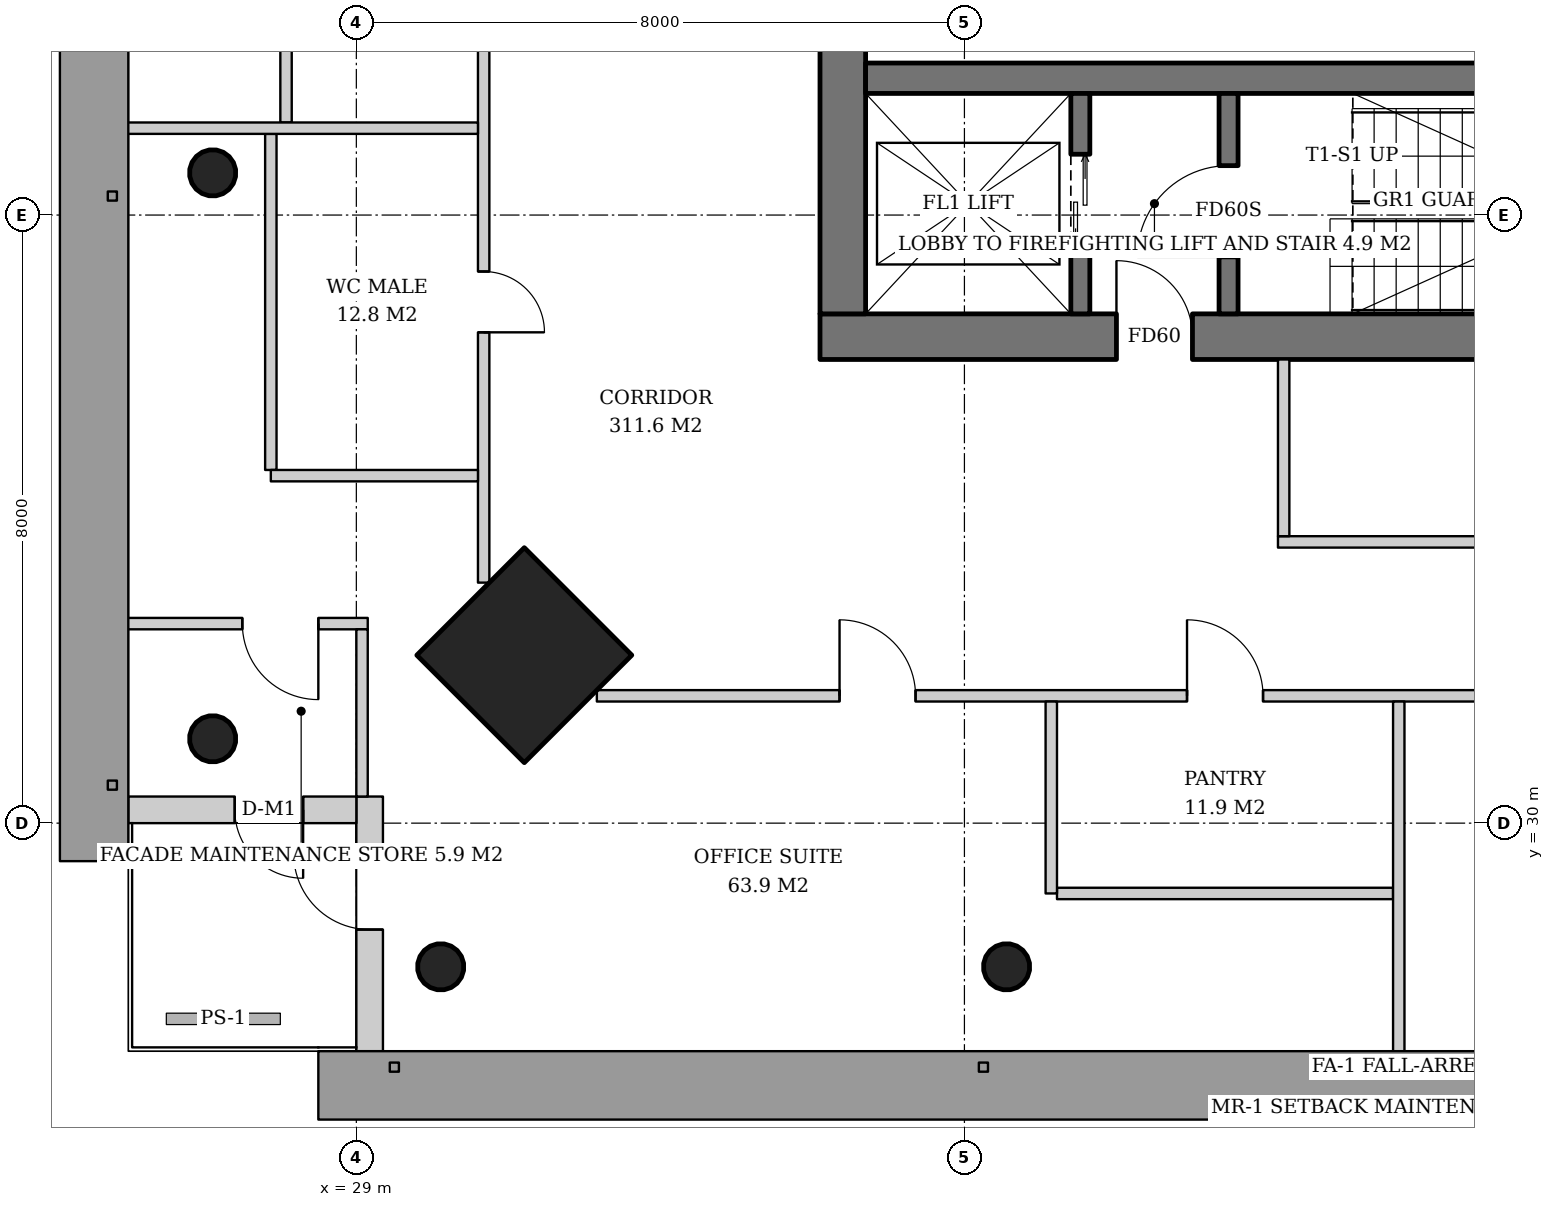
"""IFC4 building model, lengths in metres.
Left out: names, types, materials, properties, quantities, classifications, styles, units other than length and angle.
Written with IfcOpenShell. Run it as: python <this file> out.ifc"""

import sys

from ifc_helpers import new_model, si_unit, direction, frame, frame_2d, origin, origin_2d, place, context, subcontext, project, spatial, rectangle, hollow_circle, extrude, element, fill, save


model = new_model("IFC4")
c1 = context("Model", 3, precision=1e-05, world=origin(), true_north=direction((0.0, 1.0)))
c2 = subcontext(c1, "Body", "Model", "MODEL_VIEW")
j1 = project(units=[si_unit("LENGTHUNIT", "METRE"), si_unit("PLANEANGLEUNIT", "RADIAN")], contexts=[c1])
p1 = place(None, origin())
s1 = spatial("IfcSite", under=j1, at=p1, CompositionType="ELEMENT")
p2 = place(p1, origin())
s2 = spatial("IfcBuilding", under=s1, at=p2, CompositionType="ELEMENT")
p3 = place(p2, frame((0.0, 0.0, 211.0)))
s3 = spatial("IfcBuildingStorey", under=s2, at=p3, CompositionType="ELEMENT", Elevation=211.0)
p4 = place(p3, frame((31.171, 32.171, 0.0), z_axis=(0.031962158256, 0.031962158256, 0.998977898093), x_axis=(-0.707106781187, 0.707106781187, 0.0)))
e1 = element("IfcColumn", 1, at=p4, inside=s3, PredefinedType="COLUMN", context=c2, shape_type="SweptSolid", body=[
    extrude(rectangle(XDim=2.0, YDim=2.0, at=origin_2d()), origin(), (0.0, 0.0, 1.0), 3.804),
])
p5 = place(p3, frame((27.072, 31.072, 0.0), z_axis=(0.031898107953, 0.031898107953, 0.998981992539), x_axis=(-0.707106781187, 0.707106781187, 0.0)))
e2 = element("IfcColumn", 2, at=p5, inside=s3, PredefinedType="COLUMN", context=c2, shape_type="SweptSolid", body=[
    extrude(hollow_circle(Radius=0.305, WallThickness=0.025, at=origin_2d()), origin(), (0.0, 0.0, 1.0), 3.804),
])
p6 = place(p3, frame((27.072, 38.536, 0.0), z_axis=(0.031910269556, 0.015987237665, 0.999362868496), x_axis=(-0.447933021895, 0.894067115991, 0.0)))
e3 = element("IfcColumn", 3, at=p6, inside=s3, PredefinedType="COLUMN", context=c2, shape_type="SweptSolid", body=[
    extrude(hollow_circle(Radius=0.305, WallThickness=0.025, at=origin_2d()), origin(), (0.0, 0.0, 1.0), 3.802),
])
p7 = place(p3, frame((30.072, 28.072, 0.0), z_axis=(0.031898107953, 0.031898107953, 0.998981992539), x_axis=(-0.707106781187, 0.707106781187, 0.0)))
e4 = element("IfcColumn", 4, at=p7, inside=s3, PredefinedType="COLUMN", context=c2, shape_type="SweptSolid", body=[
    extrude(hollow_circle(Radius=0.305, WallThickness=0.025, at=origin_2d()), origin(), (0.0, 0.0, 1.0), 3.804),
])
p8 = place(p3, frame((37.536, 28.072, 0.0), z_axis=(0.015987237665, 0.031910269556, 0.999362868496), x_axis=(-0.894067115991, 0.447933021895, 0.0)))
e5 = element("IfcColumn", 5, at=p8, inside=s3, PredefinedType="COLUMN", context=c2, shape_type="SweptSolid", body=[
    extrude(hollow_circle(Radius=0.305, WallThickness=0.025, at=origin_2d()), origin(), (0.0, 0.0, 1.0), 3.802),
])
p9 = place(p3, frame((35.1, 36.4, 0.0), z_axis=(0.0, 0.0, 1.0), x_axis=(1.0, 0.0, 0.0)))
e6 = element("IfcWall", 6, at=p9, inside=s3, PredefinedType="SHEAR", context=c2, shape_type="SweptSolid", body=[
    extrude(rectangle(XDim=19.8, YDim=0.6, at=frame_2d((9.9, 0.0))), origin(), (0.0, 0.0, 1.0), 3.8),
])
p10 = place(p9, frame((3.9, 0.0, 0.0)))
e7 = element("IfcOpeningElement", 7, at=p10, cuts=e6, PredefinedType="OPENING", context=c2, shape_type="SweptSolid", body=[
    extrude(rectangle(XDim=1.0, YDim=2.1, at=frame_2d((0.5, 1.05))), frame((0.0, 0.31, 0.0), z_axis=(0.0, -1.0, 0.0), x_axis=(1.0, 0.0, 0.0)), (0.0, 0.0, 1.0), 0.62),
])
p11 = place(p9, frame((15.35, 0.0, 0.0)))
e8 = element("IfcOpeningElement", 8, at=p11, cuts=e6, PredefinedType="OPENING", context=c2, shape_type="SweptSolid", body=[
    extrude(rectangle(XDim=1.0, YDim=2.1, at=frame_2d((0.5, 1.05))), frame((0.0, 0.31, 0.0), z_axis=(0.0, -1.0, 0.0), x_axis=(1.0, 0.0, 0.0)), (0.0, 0.0, 1.0), 0.62),
])
p12 = place(p3, frame((35.4, 36.7, 0.0), z_axis=(0.0, 0.0, 1.0), x_axis=(0.0, 1.0, 0.0)))
e9 = element("IfcWall", 9, at=p12, inside=s3, PredefinedType="SHEAR", context=c2, shape_type="SweptSolid", body=[
    extrude(rectangle(XDim=18.6, YDim=0.6, at=frame_2d((9.3, 0.0))), origin(), (0.0, 0.0, 1.0), 3.8),
])
p13 = place(p12, frame((8.4, 0.0, 0.0)))
e10 = element("IfcOpeningElement", 10, at=p13, cuts=e9, PredefinedType="OPENING", context=c2, shape_type="SweptSolid", body=[
    extrude(rectangle(XDim=1.8, YDim=2.4, at=frame_2d((0.9, 1.2))), frame((0.0, 0.31, 0.0), z_axis=(0.0, -1.0, 0.0), x_axis=(1.0, 0.0, 0.0)), (0.0, 0.0, 1.0), 0.62),
])
p14 = place(p3, frame((35.7, 39.8, 0.0), z_axis=(0.0, 0.0, 1.0), x_axis=(1.0, 0.0, 0.0)))
e11 = element("IfcWall", 11, at=p14, inside=s3, PredefinedType="SHEAR", context=c2, shape_type="SweptSolid", body=[
    extrude(rectangle(XDim=18.6, YDim=0.4, at=frame_2d((9.3, 0.0))), origin(), (0.0, 0.0, 1.0), 3.8),
])
p15 = place(p3, frame((29.175, 27.0, 0.0), z_axis=(0.0, 0.0, 1.0), x_axis=(0.0, 1.0, 0.0)))
e12 = element("IfcWall", 12, at=p15, inside=s3, PredefinedType="SOLIDWALL", context=c2, shape_type="SweptSolid", body=[
    extrude(rectangle(XDim=3.35, YDim=0.35, at=frame_2d((1.675, 0.0))), origin(), (0.0, 0.0, 1.0), 3.62),
])
p16 = place(p15, frame((1.6, 0.0, 0.0)))
e13 = element("IfcOpeningElement", 13, at=p16, cuts=e12, PredefinedType="OPENING", context=c2, shape_type="SweptSolid", body=[
    extrude(rectangle(XDim=1.0, YDim=2.4, at=frame_2d((0.5, 1.2))), frame((0.0, 0.185, 0.0), z_axis=(0.0, -1.0, 0.0), x_axis=(1.0, 0.0, 0.0)), (0.0, 0.0, 1.0), 0.37),
])
p17 = place(p3, frame((29.0, 30.175, 0.0), z_axis=(0.0, 0.0, 1.0), x_axis=(-1.0, 0.0, 0.0)))
e14 = element("IfcWall", 14, at=p17, inside=s3, PredefinedType="SOLIDWALL", context=c2, shape_type="SweptSolid", body=[
    extrude(rectangle(XDim=3.0, YDim=0.35, at=frame_2d((1.5, 0.0))), origin(), (0.0, 0.0, 1.0), 3.62),
])
p18 = place(p17, frame((0.7, 0.0, 0.0)))
e15 = element("IfcOpeningElement", 15, at=p18, cuts=e14, PredefinedType="OPENING", context=c2, shape_type="SweptSolid", body=[
    extrude(rectangle(XDim=0.9, YDim=2.1, at=frame_2d((0.45, 1.05))), frame((0.0, 0.185, 0.0), z_axis=(0.0, -1.0, 0.0), x_axis=(1.0, 0.0, 0.0)), (0.0, 0.0, 1.0), 0.37),
])
p19 = place(p3, frame((38.525, 36.7, 0.0), z_axis=(0.0, 0.0, 1.0), x_axis=(0.0, 1.0, 0.0)))
e16 = element("IfcWall", 16, at=p19, inside=s3, PredefinedType="SHEAR", context=c2, shape_type="SweptSolid", body=[
    extrude(rectangle(XDim=2.9, YDim=0.25, at=frame_2d((1.45, 0.0))), origin(), (0.0, 0.0, 1.0), 3.8),
])
p20 = place(p19, frame((0.8, 0.0, 0.0)))
e17 = element("IfcOpeningElement", 17, at=p20, cuts=e16, PredefinedType="OPENING", context=c2, shape_type="SweptSolid", body=[
    extrude(rectangle(XDim=1.3, YDim=2.2, at=frame_2d((0.65, 1.1))), frame((0.0, 0.135, 0.0), z_axis=(0.0, -1.0, 0.0), x_axis=(1.0, 0.0, 0.0)), (0.0, 0.0, 1.0), 0.27),
])
p21 = place(p3, frame((40.475, 36.7, 0.0), z_axis=(0.0, 0.0, 1.0), x_axis=(0.0, 1.0, 0.0)))
e18 = element("IfcWall", 18, at=p21, inside=s3, PredefinedType="SHEAR", context=c2, shape_type="SweptSolid", body=[
    extrude(rectangle(XDim=2.9, YDim=0.25, at=frame_2d((1.45, 0.0))), origin(), (0.0, 0.0, 1.0), 3.8),
])
p22 = place(p21, frame((0.75, 0.0, 0.0)))
e19 = element("IfcOpeningElement", 19, at=p22, cuts=e18, PredefinedType="OPENING", context=c2, shape_type="SweptSolid", body=[
    extrude(rectangle(XDim=1.2, YDim=2.1, at=frame_2d((0.6, 1.05))), frame((0.0, 0.135, 0.0), z_axis=(0.0, -1.0, 0.0), x_axis=(1.0, 0.0, 0.0)), (0.0, 0.0, 1.0), 0.27),
])
p23 = place(p3, frame((41.125, 33.7, 0.0), z_axis=(0.0, 0.0, 1.0), x_axis=(1.0, 0.0, 0.0)))
e20 = element("IfcWall", 20, at=p23, inside=s3, PredefinedType="PARTITIONING", context=c2, shape_type="SweptSolid", body=[
    extrude(rectangle(XDim=8.2, YDim=0.15, at=frame_2d((4.1, 0.0))), origin(), (0.0, 0.0, 1.0), 2.867),
])
p24 = place(p23, frame((3.6, 0.0, 0.0)))
e21 = element("IfcOpeningElement", 21, at=p24, cuts=e20, PredefinedType="OPENING", context=c2, shape_type="SweptSolid", body=[
    extrude(rectangle(XDim=1.0, YDim=2.1, at=frame_2d((0.5, 1.05))), frame((0.0, 0.085, 0.0), z_axis=(0.0, -1.0, 0.0), x_axis=(1.0, 0.0, 0.0)), (0.0, 0.0, 1.0), 0.17),
])
p25 = place(p3, frame((41.2, 36.1, 0.0), z_axis=(0.0, 0.0, 1.0), x_axis=(0.0, -1.0, 0.0)))
e22 = element("IfcWall", 22, at=p25, inside=s3, PredefinedType="PARTITIONING", context=c2, shape_type="SweptSolid", body=[
    extrude(rectangle(XDim=2.325, YDim=0.15, at=frame_2d((1.163, 0.0))), origin(), (0.0, 0.0, 1.0), 3.62),
])
p26 = place(p3, frame((28.075, 43.639, 0.0), z_axis=(0.0, 0.0, 1.0), x_axis=(0.0, -1.0, 0.0)))
e23 = element("IfcWall", 23, at=p26, inside=s3, PredefinedType="PARTITIONING", context=c2, shape_type="SweptSolid", body=[
    extrude(rectangle(XDim=4.422, YDim=0.15, at=frame_2d((2.211, 0.0))), origin(), (0.0, 0.0, 1.0), 2.867),
])
p27 = place(p3, frame((27.875, 39.068, 0.0), z_axis=(0.0, 0.0, 1.0), x_axis=(0.0, -1.0, 0.0)))
e24 = element("IfcWall", 24, at=p27, inside=s3, PredefinedType="PARTITIONING", context=c2, shape_type="SweptSolid", body=[
    extrude(rectangle(XDim=4.421, YDim=0.15, at=frame_2d((2.211, 0.0))), origin(), (0.0, 0.0, 1.0), 2.867),
])
p28 = place(p3, frame((30.675, 58.836, 0.0), z_axis=(0.0, 0.0, 1.0), x_axis=(0.0, -1.0, 0.0)))
e25 = element("IfcWall", 25, at=p28, inside=s3, PredefinedType="PARTITIONING", context=c2, shape_type="SweptSolid", body=[
    extrude(rectangle(XDim=25.671, YDim=0.15, at=frame_2d((12.836, 0.0))), origin(), (0.0, 0.0, 1.0), 2.867),
])
p29 = place(p28, frame((3.193, 0.0, 0.0)))
e26 = element("IfcOpeningElement", 26, at=p29, cuts=e25, PredefinedType="OPENING", context=c2, shape_type="SweptSolid", body=[
    extrude(rectangle(XDim=1.0, YDim=2.1, at=frame_2d((0.5, 1.05))), frame((0.0, 0.085, 0.0), z_axis=(0.0, -1.0, 0.0), x_axis=(1.0, 0.0, 0.0)), (0.0, 0.0, 1.0), 0.17),
])
p30 = place(p28, frame((7.764, 0.0, 0.0)))
e27 = element("IfcOpeningElement", 27, at=p30, cuts=e25, PredefinedType="OPENING", context=c2, shape_type="SweptSolid", body=[
    extrude(rectangle(XDim=1.0, YDim=2.1, at=frame_2d((0.5, 1.05))), frame((0.0, 0.085, 0.0), z_axis=(0.0, -1.0, 0.0), x_axis=(1.0, 0.0, 0.0)), (0.0, 0.0, 1.0), 0.17),
])
p31 = place(p28, frame((12.436, 0.0, 0.0)))
e28 = element("IfcOpeningElement", 28, at=p31, cuts=e25, PredefinedType="OPENING", context=c2, shape_type="SweptSolid", body=[
    extrude(rectangle(XDim=0.8, YDim=2.1, at=frame_2d((0.4, 1.05))), frame((0.0, 0.085, 0.0), z_axis=(0.0, -1.0, 0.0), x_axis=(1.0, 0.0, 0.0)), (0.0, 0.0, 1.0), 0.17),
])
p32 = place(p28, frame((16.907, 0.0, 0.0)))
e29 = element("IfcOpeningElement", 29, at=p32, cuts=e25, PredefinedType="OPENING", context=c2, shape_type="SweptSolid", body=[
    extrude(rectangle(XDim=1.0, YDim=2.1, at=frame_2d((0.5, 1.05))), frame((0.0, 0.085, 0.0), z_axis=(0.0, -1.0, 0.0), x_axis=(1.0, 0.0, 0.0)), (0.0, 0.0, 1.0), 0.17),
])
p33 = place(p28, frame((21.579, 0.0, 0.0)))
e30 = element("IfcOpeningElement", 30, at=p33, cuts=e25, PredefinedType="OPENING", context=c2, shape_type="SweptSolid", body=[
    extrude(rectangle(XDim=0.8, YDim=2.1, at=frame_2d((0.4, 1.05))), frame((0.0, 0.085, 0.0), z_axis=(0.0, -1.0, 0.0), x_axis=(1.0, 0.0, 0.0)), (0.0, 0.0, 1.0), 0.17),
])
p34 = place(p3, frame((30.6, 39.143, 0.0), z_axis=(0.0, 0.0, 1.0), x_axis=(-1.0, 0.0, 0.0)))
e31 = element("IfcWall", 31, at=p34, inside=s3, PredefinedType="PARTITIONING", context=c2, shape_type="SweptSolid", body=[
    extrude(rectangle(XDim=4.64, YDim=0.15, at=frame_2d((2.32, 0.0))), origin(), (0.0, 0.0, 1.0), 3.12),
])
p35 = place(p3, frame((30.6, 34.572, 0.0), z_axis=(0.0, 0.0, 1.0), x_axis=(-1.0, 0.0, 0.0)))
e32 = element("IfcWall", 32, at=p35, inside=s3, PredefinedType="PARTITIONING", context=c2, shape_type="SweptSolid", body=[
    extrude(rectangle(XDim=2.725, YDim=0.15, at=frame_2d((1.363, 0.0))), origin(), (0.0, 0.0, 1.0), 3.62),
])
p36 = place(p3, frame((38.218, 29.075, 0.0), z_axis=(0.0, 0.0, 1.0), x_axis=(1.0, 0.0, 0.0)))
e33 = element("IfcWall", 33, at=p36, inside=s3, PredefinedType="PARTITIONING", context=c2, shape_type="SweptSolid", body=[
    extrude(rectangle(XDim=4.422, YDim=0.15, at=frame_2d((2.211, 0.0))), origin(), (0.0, 0.0, 1.0), 2.867),
])
p37 = place(p3, frame((32.164, 31.675, 0.0), z_axis=(0.0, 0.0, 1.0), x_axis=(1.0, 0.0, 0.0)))
e34 = element("IfcWall", 34, at=p37, inside=s3, PredefinedType="PARTITIONING", context=c2, shape_type="SweptSolid", body=[
    extrude(rectangle(XDim=25.671, YDim=0.15, at=frame_2d((12.836, 0.0))), origin(), (0.0, 0.0, 1.0), 2.867),
])
p38 = place(p37, frame((3.193, 0.0, 0.0)))
e35 = element("IfcOpeningElement", 35, at=p38, cuts=e34, PredefinedType="OPENING", context=c2, shape_type="SweptSolid", body=[
    extrude(rectangle(XDim=1.0, YDim=2.1, at=frame_2d((0.5, 1.05))), frame((0.0, 0.085, 0.0), z_axis=(0.0, -1.0, 0.0), x_axis=(1.0, 0.0, 0.0)), (0.0, 0.0, 1.0), 0.17),
])
p39 = place(p37, frame((7.764, 0.0, 0.0)))
e36 = element("IfcOpeningElement", 36, at=p39, cuts=e34, PredefinedType="OPENING", context=c2, shape_type="SweptSolid", body=[
    extrude(rectangle(XDim=1.0, YDim=2.1, at=frame_2d((0.5, 1.05))), frame((0.0, 0.085, 0.0), z_axis=(0.0, -1.0, 0.0), x_axis=(1.0, 0.0, 0.0)), (0.0, 0.0, 1.0), 0.17),
])
p40 = place(p37, frame((12.336, 0.0, 0.0)))
e37 = element("IfcOpeningElement", 37, at=p40, cuts=e34, PredefinedType="OPENING", context=c2, shape_type="SweptSolid", body=[
    extrude(rectangle(XDim=1.0, YDim=2.1, at=frame_2d((0.5, 1.05))), frame((0.0, 0.085, 0.0), z_axis=(0.0, -1.0, 0.0), x_axis=(1.0, 0.0, 0.0)), (0.0, 0.0, 1.0), 0.17),
])
p41 = place(p37, frame((21.479, 0.0, 0.0)))
e38 = element("IfcOpeningElement", 38, at=p41, cuts=e34, PredefinedType="OPENING", context=c2, shape_type="SweptSolid", body=[
    extrude(rectangle(XDim=1.0, YDim=2.1, at=frame_2d((0.5, 1.05))), frame((0.0, 0.085, 0.0), z_axis=(0.0, -1.0, 0.0), x_axis=(1.0, 0.0, 0.0)), (0.0, 0.0, 1.0), 0.17),
])
p42 = place(p3, frame((38.143, 31.6, 0.0), z_axis=(0.0, 0.0, 1.0), x_axis=(0.0, -1.0, 0.0)))
e39 = element("IfcWall", 39, at=p42, inside=s3, PredefinedType="PARTITIONING", context=c2, shape_type="SweptSolid", body=[
    extrude(rectangle(XDim=2.525, YDim=0.15, at=frame_2d((1.263, 0.0))), origin(), (0.0, 0.0, 1.0), 3.62),
])
p43 = place(p3, frame((42.714, 31.6, 0.0), z_axis=(0.0, 0.0, 1.0), x_axis=(0.0, -1.0, 0.0)))
e40 = element("IfcWall", 40, at=p43, inside=s3, PredefinedType="PARTITIONING", context=c2, shape_type="SweptSolid", body=[
    extrude(rectangle(XDim=4.64, YDim=0.15, at=frame_2d((2.32, 0.0))), origin(), (0.0, 0.0, 1.0), 3.12),
])
p44 = place(p3, frame((29.15, 32.625, 0.0), z_axis=(0.0, 0.0, 1.0), x_axis=(-1.0, 0.0, 0.0)))
e41 = element("IfcWall", 41, at=p44, inside=s3, PredefinedType="PARTITIONING", context=c2, shape_type="SweptSolid", body=[
    extrude(rectangle(XDim=3.19, YDim=0.15, at=frame_2d((1.595, 0.0))), origin(), (0.0, 0.0, 1.0), 3.12),
])
p45 = place(p44, frame((0.65, 0.0, 0.0)))
e42 = element("IfcOpeningElement", 42, at=p45, cuts=e41, PredefinedType="OPENING", context=c2, shape_type="SweptSolid", body=[
    extrude(rectangle(XDim=1.0, YDim=2.1, at=frame_2d((0.5, 1.05))), frame((0.0, 0.085, 0.0), z_axis=(0.0, -1.0, 0.0), x_axis=(1.0, 0.0, 0.0)), (0.0, 0.0, 1.0), 0.17),
])
p46 = place(p3, frame((29.075, 32.55, 0.0), z_axis=(0.0, 0.0, 1.0), x_axis=(0.0, -1.0, 0.0)))
e43 = element("IfcWall", 43, at=p46, inside=s3, PredefinedType="PARTITIONING", context=c2, shape_type="SweptSolid", body=[
    extrude(rectangle(XDim=2.2, YDim=0.15, at=frame_2d((1.1, 0.0))), origin(), (0.0, 0.0, 1.0), 3.02),
])
p47 = place(p18, origin())
e44 = element("IfcDoor", 44, at=p47, inside=s3, OperationType="SINGLE_SWING_LEFT", PredefinedType="DOOR", context=c2, shape_type="SweptSolid", body=[
    extrude(rectangle(XDim=0.9, YDim=2.1, at=frame_2d((0.45, 1.05))), frame((0.0, 0.025, 0.0), z_axis=(0.0, -1.0, 0.0), x_axis=(1.0, 0.0, 0.0)), (0.0, 0.0, 1.0), 0.05),
])
fill(e15, e44)
p48 = place(p16, origin())
e45 = element("IfcDoor", 45, at=p48, inside=s3, OperationType="SINGLE_SWING_RIGHT", PredefinedType="DOOR", context=c2, shape_type="SweptSolid", body=[
    extrude(rectangle(XDim=1.0, YDim=2.4, at=frame_2d((0.5, 1.2))), frame((0.0, 0.025, 0.0), z_axis=(0.0, -1.0, 0.0), x_axis=(1.0, 0.0, 0.0)), (0.0, 0.0, 1.0), 0.05),
])
fill(e13, e45)
p49 = place(p20, origin())
e46 = element("IfcDoor", 46, at=p49, inside=s3, OperationType="DOUBLE_DOOR_SLIDING", PredefinedType="DOOR", context=c2, shape_type="SweptSolid", body=[
    extrude(rectangle(XDim=1.3, YDim=2.2, at=frame_2d((0.65, 1.1))), frame((0.0, 0.025, 0.0), z_axis=(0.0, -1.0, 0.0), x_axis=(1.0, 0.0, 0.0)), (0.0, 0.0, 1.0), 0.05),
])
fill(e17, e46)
p50 = place(p22, origin())
e47 = element("IfcDoor", 47, at=p50, inside=s3, OperationType="SINGLE_SWING_LEFT", PredefinedType="DOOR", context=c2, shape_type="SweptSolid", body=[
    extrude(rectangle(XDim=1.2, YDim=2.1, at=frame_2d((0.6, 1.05))), frame((0.0, 0.025, 0.0), z_axis=(0.0, -1.0, 0.0), x_axis=(1.0, 0.0, 0.0)), (0.0, 0.0, 1.0), 0.05),
])
fill(e19, e47)
p51 = place(p10, origin())
e48 = element("IfcDoor", 48, at=p51, inside=s3, OperationType="SINGLE_SWING_LEFT", PredefinedType="DOOR", context=c2, shape_type="SweptSolid", body=[
    extrude(rectangle(XDim=1.0, YDim=2.1, at=frame_2d((0.5, 1.05))), frame((0.0, 0.025, 0.0), z_axis=(0.0, -1.0, 0.0), x_axis=(1.0, 0.0, 0.0)), (0.0, 0.0, 1.0), 0.05),
])
fill(e7, e48)
p52 = place(p33, origin())
e49 = element("IfcDoor", 49, at=p52, inside=s3, OperationType="SINGLE_SWING_RIGHT", PredefinedType="DOOR", context=c2, shape_type="SweptSolid", body=[
    extrude(rectangle(XDim=0.8, YDim=2.1, at=frame_2d((0.4, 1.05))), frame((0.0, 0.025, 0.0), z_axis=(0.0, -1.0, 0.0), x_axis=(1.0, 0.0, 0.0)), (0.0, 0.0, 1.0), 0.05),
])
fill(e30, e49)
p53 = place(p38, origin())
e50 = element("IfcDoor", 50, at=p53, inside=s3, OperationType="SINGLE_SWING_LEFT", PredefinedType="DOOR", context=c2, shape_type="SweptSolid", body=[
    extrude(rectangle(XDim=1.0, YDim=2.1, at=frame_2d((0.5, 1.05))), frame((0.0, 0.025, 0.0), z_axis=(0.0, -1.0, 0.0), x_axis=(1.0, 0.0, 0.0)), (0.0, 0.0, 1.0), 0.05),
])
fill(e35, e50)
p54 = place(p39, origin())
e51 = element("IfcDoor", 51, at=p54, inside=s3, OperationType="SINGLE_SWING_LEFT", PredefinedType="DOOR", context=c2, shape_type="SweptSolid", body=[
    extrude(rectangle(XDim=1.0, YDim=2.1, at=frame_2d((0.5, 1.05))), frame((0.0, 0.025, 0.0), z_axis=(0.0, -1.0, 0.0), x_axis=(1.0, 0.0, 0.0)), (0.0, 0.0, 1.0), 0.05),
])
fill(e36, e51)
p55 = place(p45, origin())
e52 = element("IfcDoor", 52, at=p55, inside=s3, OperationType="SINGLE_SWING_LEFT", PredefinedType="DOOR", context=c2, shape_type="SweptSolid", body=[
    extrude(rectangle(XDim=1.0, YDim=2.1, at=frame_2d((0.5, 1.05))), frame((0.0, 0.025, 0.0), z_axis=(0.0, -1.0, 0.0), x_axis=(1.0, 0.0, 0.0)), (0.0, 0.0, 1.0), 0.05),
])
fill(e42, e52)
save(model, sys.argv[1])
